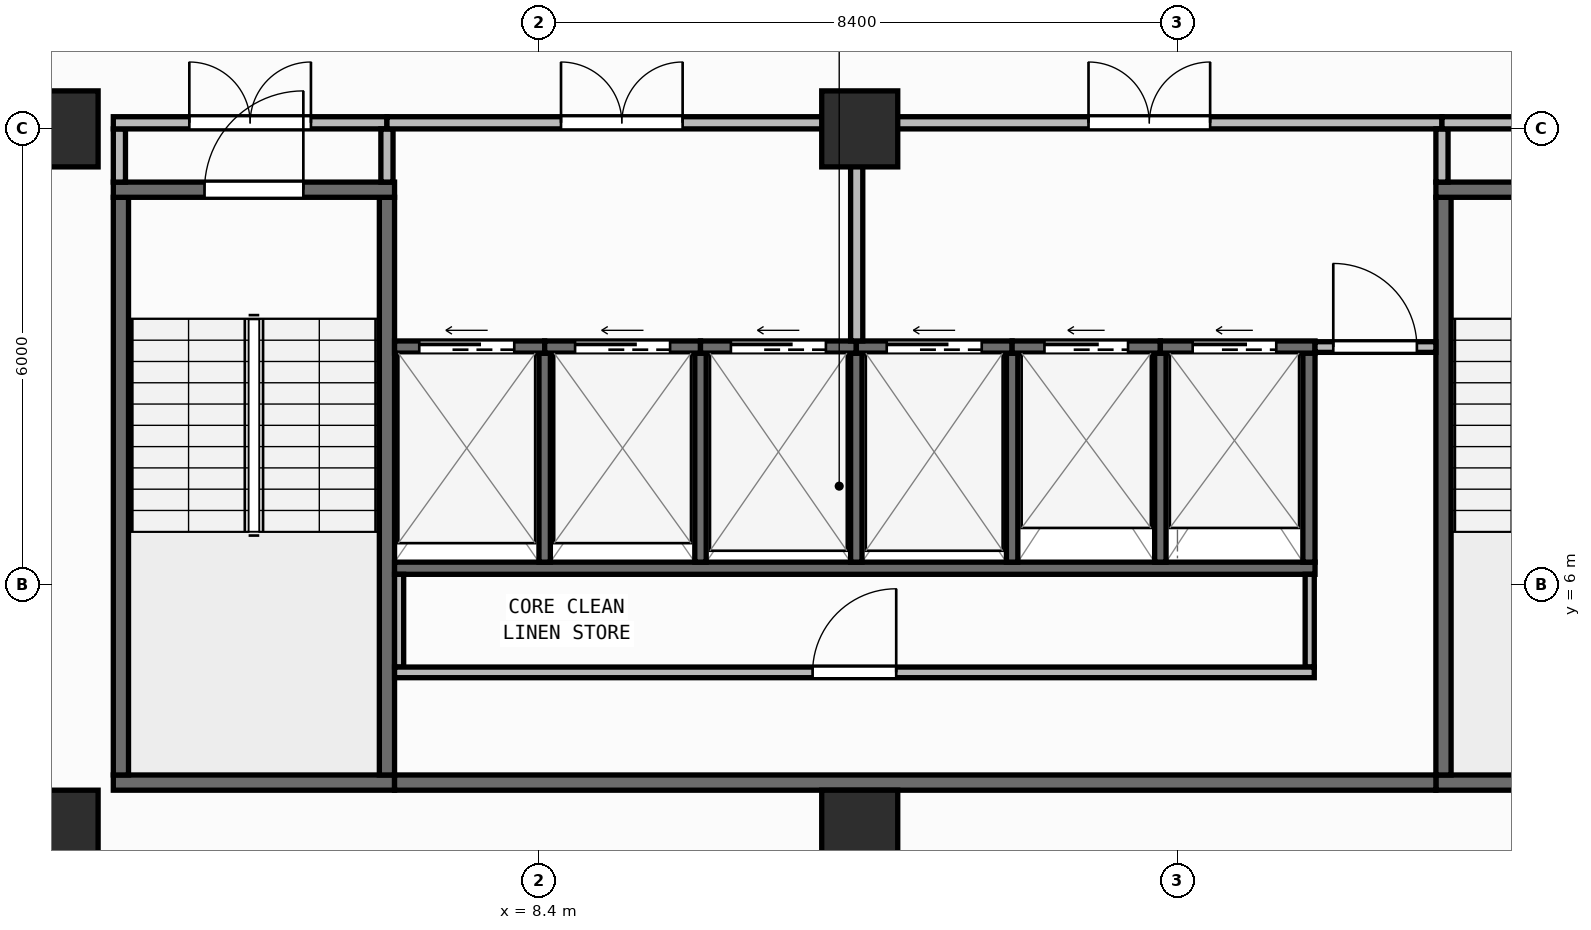
"""IFC4 building model, lengths in metres.
Left out: names, types, materials, properties, quantities, classifications, styles, units other than length and angle.
Written with IfcOpenShell. Run it as: python <this file> out.ifc"""

import sys

from ifc_helpers import new_model, si_unit, direction, frame, frame_2d, origin, origin_2d, place, context, subcontext, project, spatial, rectangle, extrude, element, fill, save


model = new_model("IFC4")
c1 = context("Model", 3, precision=1e-05, world=origin(), true_north=direction((0.0, 1.0)))
c2 = subcontext(c1, "Body", "Model", "MODEL_VIEW")
j1 = project(units=[si_unit("LENGTHUNIT", "METRE"), si_unit("PLANEANGLEUNIT", "RADIAN")], contexts=[c1])
p1 = place(None, origin())
s1 = spatial("IfcSite", under=j1, at=p1, CompositionType="ELEMENT")
p2 = place(p1, origin())
s2 = spatial("IfcBuilding", under=s1, at=p2, CompositionType="ELEMENT")
p3 = place(p2, frame((0.0, 0.0, 203.95)))
s3 = spatial("IfcBuildingStorey", under=s2, at=p3, CompositionType="ELEMENT", Elevation=203.95)
for number, where, z_axis, x_axis in (
    (1, (2.1, 2.8, 0.0), (0.0, 0.0, 1.0), (1.0, 0.0, 0.0)),
    (2, (12.62, 2.8, 0.0), (0.0, 0.0, 1.0), (1.0, 0.0, 0.0)),
    (3, (2.1, 12.0, 0.0), (0.0, 0.0, 1.0), (1.0, 0.0, 0.0)),
    (4, (12.62, 12.0, 0.0), (0.0, 0.0, 1.0), (1.0, 0.0, 0.0)),
):
    element("IfcColumn", number, at=place(p3, frame(where, z_axis=z_axis, x_axis=x_axis)), inside=s3, PredefinedType="COLUMN", context=c2, shape_type="SweptSolid", body=[
        extrude(rectangle(XDim=1.0, YDim=1.0, at=origin_2d()), origin(), (0.0, 0.0, 1.0), 3.95),
    ])
p4 = place(p3, frame((2.66, 0.174, 0.0), z_axis=(0.0, 0.0, 1.0), x_axis=(0.996634028439, 0.081979347142, 0.0)))
e5 = element("IfcWall", 5, at=p4, inside=s3, PredefinedType="STANDARD", context=c2, shape_type="SweptSolid", body=[
    extrude(rectangle(XDim=46.035, YDim=0.26, at=frame_2d((23.018, 0.0))), origin(), (0.0, 0.0, 1.0), 3.71),
])
p5 = place(p4, frame((21.817, 0.0, 0.9)))
e6 = element("IfcOpeningElement", 6, at=p5, cuts=e5, PredefinedType="OPENING", context=c2, shape_type="SweptSolid", body=[
    extrude(rectangle(XDim=2.4, YDim=1.65, at=frame_2d((1.2, 0.825))), frame((0.0, 0.14, 0.0), z_axis=(0.0, -1.0, 0.0), x_axis=(1.0, 0.0, 0.0)), (0.0, 0.0, 1.0), 0.28),
])
p6 = place(p3, frame((2.8, 3.4, 0.0), z_axis=(0.0, 0.0, 1.0), x_axis=(1.0, 0.0, 0.0)))
e7 = element("IfcWall", 7, at=p6, inside=s3, PredefinedType="SHEAR", context=c2, shape_type="SweptSolid", body=[
    extrude(rectangle(XDim=3.7, YDim=0.2, at=frame_2d((1.85, 0.0))), origin(), (0.0, 0.0, 1.0), 3.71),
])
for number, where, z_axis, x_axis in (
    (8, (2.9, 3.5, 0.0), (0.0, 0.0, 1.0), (0.0, 1.0, 0.0)),
    (9, (6.4, 3.5, 0.0), (0.0, 0.0, 1.0), (0.0, 1.0, 0.0)),
):
    element("IfcWall", number, at=place(p3, frame(where, z_axis=z_axis, x_axis=x_axis)), inside=s3, PredefinedType="SHEAR", context=c2, shape_type="SweptSolid", body=[
        extrude(rectangle(XDim=7.6, YDim=0.2, at=frame_2d((3.8, 0.0))), origin(), (0.0, 0.0, 1.0), 3.71),
    ])
p7 = place(p3, frame((2.8, 11.2, 0.0), z_axis=(0.0, 0.0, 1.0), x_axis=(1.0, 0.0, 0.0)))
e10 = element("IfcWall", 10, at=p7, inside=s3, PredefinedType="SHEAR", context=c2, shape_type="SweptSolid", body=[
    extrude(rectangle(XDim=3.7, YDim=0.2, at=frame_2d((1.85, 0.0))), origin(), (0.0, 0.0, 1.0), 3.71),
])
p8 = place(p7, frame((1.2, 0.0, 0.0)))
e11 = element("IfcOpeningElement", 11, at=p8, cuts=e10, PredefinedType="OPENING", context=c2, shape_type="SweptSolid", body=[
    extrude(rectangle(XDim=1.3, YDim=2.15, at=frame_2d((0.65, 1.075))), frame((0.0, 0.11, 0.0), z_axis=(0.0, -1.0, 0.0), x_axis=(1.0, 0.0, 0.0)), (0.0, 0.0, 1.0), 0.22),
])
p9 = place(p3, frame((20.2, 3.4, 0.0), z_axis=(0.0, 0.0, 1.0), x_axis=(1.0, 0.0, 0.0)))
e12 = element("IfcWall", 12, at=p9, inside=s3, PredefinedType="SHEAR", context=c2, shape_type="SweptSolid", body=[
    extrude(rectangle(XDim=3.7, YDim=0.2, at=frame_2d((1.85, 0.0))), origin(), (0.0, 0.0, 1.0), 3.71),
])
p10 = place(p3, frame((20.3, 3.5, 0.0), z_axis=(0.0, 0.0, 1.0), x_axis=(0.0, 1.0, 0.0)))
e13 = element("IfcWall", 13, at=p10, inside=s3, PredefinedType="SHEAR", context=c2, shape_type="SweptSolid", body=[
    extrude(rectangle(XDim=7.6, YDim=0.2, at=frame_2d((3.8, 0.0))), origin(), (0.0, 0.0, 1.0), 3.71),
])
p11 = place(p3, frame((20.2, 11.2, 0.0), z_axis=(0.0, 0.0, 1.0), x_axis=(1.0, 0.0, 0.0)))
e14 = element("IfcWall", 14, at=p11, inside=s3, PredefinedType="SHEAR", context=c2, shape_type="SweptSolid", body=[
    extrude(rectangle(XDim=3.7, YDim=0.2, at=frame_2d((1.85, 0.0))), origin(), (0.0, 0.0, 1.0), 3.71),
])
p12 = place(p11, frame((1.2, 0.0, 0.0)))
e15 = element("IfcOpeningElement", 15, at=p12, cuts=e14, PredefinedType="OPENING", context=c2, shape_type="SweptSolid", body=[
    extrude(rectangle(XDim=1.3, YDim=2.15, at=frame_2d((0.65, 1.075))), frame((0.0, 0.11, 0.0), z_axis=(0.0, -1.0, 0.0), x_axis=(1.0, 0.0, 0.0)), (0.0, 0.0, 1.0), 0.22),
])
p13 = place(p3, frame((6.5, 3.4, 0.0), z_axis=(0.0, 0.0, 1.0), x_axis=(1.0, 0.0, 0.0)))
e16 = element("IfcWall", 16, at=p13, inside=s3, PredefinedType="SHEAR", context=c2, shape_type="SweptSolid", body=[
    extrude(rectangle(XDim=13.7, YDim=0.2, at=frame_2d((6.85, 0.0))), origin(), (0.0, 0.0, 1.0), 3.71),
])
p14 = place(p3, frame((6.5, 6.22, 0.0), z_axis=(0.0, 0.0, 1.0), x_axis=(1.0, 0.0, 0.0)))
e17 = element("IfcWall", 17, at=p14, inside=s3, PredefinedType="SHEAR", context=c2, shape_type="SweptSolid", body=[
    extrude(rectangle(XDim=12.11, YDim=0.16, at=frame_2d((6.055, 0.0))), origin(), (0.0, 0.0, 1.0), 3.71),
])
p15 = place(p3, frame((18.53, 6.3, 0.0), z_axis=(0.0, 0.0, 1.0), x_axis=(0.0, 1.0, 0.0)))
e18 = element("IfcWall", 18, at=p15, inside=s3, PredefinedType="SHEAR", context=c2, shape_type="SweptSolid", body=[
    extrude(rectangle(XDim=2.75, YDim=0.16, at=frame_2d((1.375, 0.0))), origin(), (0.0, 0.0, 1.0), 3.71),
])
for number, where, z_axis, x_axis in (
    (19, (8.475, 6.3, 0.0), (0.0, 0.0, 1.0), (0.0, 1.0, 0.0)),
    (20, (10.525, 6.3, 0.0), (0.0, 0.0, 1.0), (0.0, 1.0, 0.0)),
    (21, (12.575, 6.3, 0.0), (0.0, 0.0, 1.0), (0.0, 1.0, 0.0)),
    (22, (14.625, 6.3, 0.0), (0.0, 0.0, 1.0), (0.0, 1.0, 0.0)),
    (23, (16.575, 6.3, 0.0), (0.0, 0.0, 1.0), (0.0, 1.0, 0.0)),
):
    element("IfcWall", number, at=place(p3, frame(where, z_axis=z_axis, x_axis=x_axis)), inside=s3, PredefinedType="SHEAR", context=c2, shape_type="SweptSolid", body=[
        extrude(rectangle(XDim=2.75, YDim=0.15, at=frame_2d((1.375, 0.0))), origin(), (0.0, 0.0, 1.0), 3.71),
    ])
p16 = place(p3, frame((6.5, 9.13, 0.0), z_axis=(0.0, 0.0, 1.0), x_axis=(1.0, 0.0, 0.0)))
e24 = element("IfcWall", 24, at=p16, inside=s3, PredefinedType="SHEAR", context=c2, shape_type="SweptSolid", body=[
    extrude(rectangle(XDim=1.975, YDim=0.16, at=frame_2d((0.988, 0.0))), origin(), (0.0, 0.0, 1.0), 3.71),
])
p17 = place(p16, frame((0.325, 0.0, 0.0)))
e25 = element("IfcOpeningElement", 25, at=p17, cuts=e24, PredefinedType="OPENING", context=c2, shape_type="SweptSolid", body=[
    extrude(rectangle(XDim=1.25, YDim=2.15, at=frame_2d((0.625, 1.075))), frame((0.0, 0.09, 0.0), z_axis=(0.0, -1.0, 0.0), x_axis=(1.0, 0.0, 0.0)), (0.0, 0.0, 1.0), 0.18),
])
p18 = place(p3, frame((8.475, 9.13, 0.0), z_axis=(0.0, 0.0, 1.0), x_axis=(1.0, 0.0, 0.0)))
e26 = element("IfcWall", 26, at=p18, inside=s3, PredefinedType="SHEAR", context=c2, shape_type="SweptSolid", body=[
    extrude(rectangle(XDim=2.05, YDim=0.16, at=frame_2d((1.025, 0.0))), origin(), (0.0, 0.0, 1.0), 3.71),
])
p19 = place(p18, frame((0.4, 0.0, 0.0)))
e27 = element("IfcOpeningElement", 27, at=p19, cuts=e26, PredefinedType="OPENING", context=c2, shape_type="SweptSolid", body=[
    extrude(rectangle(XDim=1.25, YDim=2.15, at=frame_2d((0.625, 1.075))), frame((0.0, 0.09, 0.0), z_axis=(0.0, -1.0, 0.0), x_axis=(1.0, 0.0, 0.0)), (0.0, 0.0, 1.0), 0.18),
])
p20 = place(p3, frame((10.525, 9.13, 0.0), z_axis=(0.0, 0.0, 1.0), x_axis=(1.0, 0.0, 0.0)))
e28 = element("IfcWall", 28, at=p20, inside=s3, PredefinedType="SHEAR", context=c2, shape_type="SweptSolid", body=[
    extrude(rectangle(XDim=2.05, YDim=0.16, at=frame_2d((1.025, 0.0))), origin(), (0.0, 0.0, 1.0), 3.71),
])
p21 = place(p20, frame((0.4, 0.0, 0.0)))
e29 = element("IfcOpeningElement", 29, at=p21, cuts=e28, PredefinedType="OPENING", context=c2, shape_type="SweptSolid", body=[
    extrude(rectangle(XDim=1.25, YDim=2.15, at=frame_2d((0.625, 1.075))), frame((0.0, 0.09, 0.0), z_axis=(0.0, -1.0, 0.0), x_axis=(1.0, 0.0, 0.0)), (0.0, 0.0, 1.0), 0.18),
])
p22 = place(p3, frame((12.575, 9.13, 0.0), z_axis=(0.0, 0.0, 1.0), x_axis=(1.0, 0.0, 0.0)))
e30 = element("IfcWall", 30, at=p22, inside=s3, PredefinedType="SHEAR", context=c2, shape_type="SweptSolid", body=[
    extrude(rectangle(XDim=2.05, YDim=0.16, at=frame_2d((1.025, 0.0))), origin(), (0.0, 0.0, 1.0), 3.71),
])
p23 = place(p22, frame((0.4, 0.0, 0.0)))
e31 = element("IfcOpeningElement", 31, at=p23, cuts=e30, PredefinedType="OPENING", context=c2, shape_type="SweptSolid", body=[
    extrude(rectangle(XDim=1.25, YDim=2.15, at=frame_2d((0.625, 1.075))), frame((0.0, 0.09, 0.0), z_axis=(0.0, -1.0, 0.0), x_axis=(1.0, 0.0, 0.0)), (0.0, 0.0, 1.0), 0.18),
])
p24 = place(p3, frame((14.625, 9.13, 0.0), z_axis=(0.0, 0.0, 1.0), x_axis=(1.0, 0.0, 0.0)))
e32 = element("IfcWall", 32, at=p24, inside=s3, PredefinedType="SHEAR", context=c2, shape_type="SweptSolid", body=[
    extrude(rectangle(XDim=1.95, YDim=0.16, at=frame_2d((0.975, 0.0))), origin(), (0.0, 0.0, 1.0), 3.71),
])
p25 = place(p24, frame((0.425, 0.0, 0.0)))
e33 = element("IfcOpeningElement", 33, at=p25, cuts=e32, PredefinedType="OPENING", context=c2, shape_type="SweptSolid", body=[
    extrude(rectangle(XDim=1.1, YDim=2.15, at=frame_2d((0.55, 1.075))), frame((0.0, 0.09, 0.0), z_axis=(0.0, -1.0, 0.0), x_axis=(1.0, 0.0, 0.0)), (0.0, 0.0, 1.0), 0.18),
])
p26 = place(p3, frame((16.575, 9.13, 0.0), z_axis=(0.0, 0.0, 1.0), x_axis=(1.0, 0.0, 0.0)))
e34 = element("IfcWall", 34, at=p26, inside=s3, PredefinedType="SHEAR", context=c2, shape_type="SweptSolid", body=[
    extrude(rectangle(XDim=2.035, YDim=0.16, at=frame_2d((1.018, 0.0))), origin(), (0.0, 0.0, 1.0), 3.71),
])
p27 = place(p26, frame((0.425, 0.0, 0.0)))
e35 = element("IfcOpeningElement", 35, at=p27, cuts=e34, PredefinedType="OPENING", context=c2, shape_type="SweptSolid", body=[
    extrude(rectangle(XDim=1.1, YDim=2.15, at=frame_2d((0.55, 1.075))), frame((0.0, 0.09, 0.0), z_axis=(0.0, -1.0, 0.0), x_axis=(1.0, 0.0, 0.0)), (0.0, 0.0, 1.0), 0.18),
])
for number, where, z_axis, x_axis in (
    (36, (6.56, 4.92, 0.0), (0.0, 0.0, 1.0), (0.0, 1.0, 0.0)),
    (37, (18.54, 4.92, 0.0), (0.0, 0.0, 1.0), (0.0, 1.0, 0.0)),
):
    element("IfcWall", number, at=place(p3, frame(where, z_axis=z_axis, x_axis=x_axis)), inside=s3, PredefinedType="PARTITIONING", context=c2, shape_type="SweptSolid", body=[
        extrude(rectangle(XDim=1.22, YDim=0.12, at=frame_2d((0.61, 0.0))), origin(), (0.0, 0.0, 1.0), 3.71),
    ])
p28 = place(p3, frame((6.5, 4.85, 0.0), z_axis=(0.0, 0.0, 1.0), x_axis=(1.0, 0.0, 0.0)))
e38 = element("IfcWall", 38, at=p28, inside=s3, PredefinedType="PARTITIONING", context=c2, shape_type="SweptSolid", body=[
    extrude(rectangle(XDim=12.1, YDim=0.14, at=frame_2d((6.05, 0.0))), origin(), (0.0, 0.0, 1.0), 3.71),
])
p29 = place(p28, frame((5.5, 0.0, 0.0)))
e39 = element("IfcOpeningElement", 39, at=p29, cuts=e38, PredefinedType="OPENING", context=c2, shape_type="SweptSolid", body=[
    extrude(rectangle(XDim=1.1, YDim=2.1, at=frame_2d((0.55, 1.05))), frame((0.0, 0.08, 0.0), z_axis=(0.0, -1.0, 0.0), x_axis=(1.0, 0.0, 0.0)), (0.0, 0.0, 1.0), 0.16),
])
p30 = place(p3, frame((18.61, 9.13, 0.0), z_axis=(0.0, 0.0, 1.0), x_axis=(1.0, 0.0, 0.0)))
e40 = element("IfcWall", 40, at=p30, inside=s3, PredefinedType="PARTITIONING", context=c2, shape_type="SweptSolid", body=[
    extrude(rectangle(XDim=1.59, YDim=0.14, at=frame_2d((0.795, 0.0))), origin(), (0.0, 0.0, 1.0), 3.71),
])
p31 = place(p30, frame((0.24, 0.0, 0.0)))
e41 = element("IfcOpeningElement", 41, at=p31, cuts=e40, PredefinedType="OPENING", context=c2, shape_type="SweptSolid", body=[
    extrude(rectangle(XDim=1.1, YDim=2.1, at=frame_2d((0.55, 1.05))), frame((0.0, 0.08, 0.0), z_axis=(0.0, -1.0, 0.0), x_axis=(1.0, 0.0, 0.0)), (0.0, 0.0, 1.0), 0.16),
])
p32 = place(p3, frame((2.88, 11.3, 0.0), z_axis=(0.0, 0.0, 1.0), x_axis=(0.0, 1.0, 0.0)))
e42 = element("IfcWall", 42, at=p32, inside=s3, PredefinedType="PARTITIONING", context=c2, shape_type="SweptSolid", body=[
    extrude(rectangle(XDim=0.7, YDim=0.16, at=frame_2d((0.35, 0.0))), origin(), (0.0, 0.0, 1.0), 3.71),
])
p33 = place(p3, frame((2.8, 12.08, 0.0), z_axis=(0.0, 0.0, 1.0), x_axis=(1.0, 0.0, 0.0)))
e43 = element("IfcWall", 43, at=p33, inside=s3, PredefinedType="PARTITIONING", context=c2, shape_type="SweptSolid", body=[
    extrude(rectangle(XDim=3.6, YDim=0.16, at=frame_2d((1.8, 0.0))), origin(), (0.0, 0.0, 1.0), 3.152),
])
p34 = place(p33, frame((1.0, 0.0, 0.0)))
e44 = element("IfcOpeningElement", 44, at=p34, cuts=e43, PredefinedType="OPENING", context=c2, shape_type="SweptSolid", body=[
    extrude(rectangle(XDim=1.6, YDim=2.05, at=frame_2d((0.8, 1.025))), frame((0.0, 0.09, 0.0), z_axis=(0.0, -1.0, 0.0), x_axis=(1.0, 0.0, 0.0)), (0.0, 0.0, 1.0), 0.18),
])
p35 = place(p3, frame((6.4, 11.3, 0.0), z_axis=(0.0, 0.0, 1.0), x_axis=(0.0, 1.0, 0.0)))
e45 = element("IfcWall", 45, at=p35, inside=s3, PredefinedType="PARTITIONING", context=c2, shape_type="SweptSolid", body=[
    extrude(rectangle(XDim=0.7, YDim=0.16, at=frame_2d((0.35, 0.0))), origin(), (0.0, 0.0, 1.0), 3.71),
])
p36 = place(p3, frame((6.4, 12.08, 0.0), z_axis=(0.0, 0.0, 1.0), x_axis=(1.0, 0.0, 0.0)))
e46 = element("IfcWall", 46, at=p36, inside=s3, PredefinedType="PARTITIONING", context=c2, shape_type="SweptSolid", body=[
    extrude(rectangle(XDim=6.18, YDim=0.16, at=frame_2d((3.09, 0.0))), origin(), (0.0, 0.0, 1.0), 3.152),
])
p37 = place(p36, frame((2.29, 0.0, 0.0)))
e47 = element("IfcOpeningElement", 47, at=p37, cuts=e46, PredefinedType="OPENING", context=c2, shape_type="SweptSolid", body=[
    extrude(rectangle(XDim=1.6, YDim=2.05, at=frame_2d((0.8, 1.025))), frame((0.0, 0.09, 0.0), z_axis=(0.0, -1.0, 0.0), x_axis=(1.0, 0.0, 0.0)), (0.0, 0.0, 1.0), 0.18),
])
p38 = place(p3, frame((12.58, 9.21, 0.0), z_axis=(0.0, 0.0, 1.0), x_axis=(0.0, 1.0, 0.0)))
e48 = element("IfcWall", 48, at=p38, inside=s3, PredefinedType="PARTITIONING", context=c2, shape_type="SweptSolid", body=[
    extrude(rectangle(XDim=2.79, YDim=0.16, at=frame_2d((1.395, 0.0))), origin(), (0.0, 0.0, 1.0), 3.71),
])
p39 = place(p3, frame((12.58, 12.08, 0.0), z_axis=(0.0, 0.0, 1.0), x_axis=(1.0, 0.0, 0.0)))
e49 = element("IfcWall", 49, at=p39, inside=s3, PredefinedType="PARTITIONING", context=c2, shape_type="SweptSolid", body=[
    extrude(rectangle(XDim=7.7, YDim=0.16, at=frame_2d((3.85, 0.0))), origin(), (0.0, 0.0, 1.0), 3.152),
])
p40 = place(p39, frame((3.05, 0.0, 0.0)))
e50 = element("IfcOpeningElement", 50, at=p40, cuts=e49, PredefinedType="OPENING", context=c2, shape_type="SweptSolid", body=[
    extrude(rectangle(XDim=1.6, YDim=2.05, at=frame_2d((0.8, 1.025))), frame((0.0, 0.09, 0.0), z_axis=(0.0, -1.0, 0.0), x_axis=(1.0, 0.0, 0.0)), (0.0, 0.0, 1.0), 0.18),
])
p41 = place(p3, frame((20.28, 11.3, 0.0), z_axis=(0.0, 0.0, 1.0), x_axis=(0.0, 1.0, 0.0)))
e51 = element("IfcWall", 51, at=p41, inside=s3, PredefinedType="PARTITIONING", context=c2, shape_type="SweptSolid", body=[
    extrude(rectangle(XDim=0.7, YDim=0.16, at=frame_2d((0.35, 0.0))), origin(), (0.0, 0.0, 1.0), 3.71),
])
p42 = place(p3, frame((20.28, 12.08, 0.0), z_axis=(0.0, 0.0, 1.0), x_axis=(1.0, 0.0, 0.0)))
e52 = element("IfcWall", 52, at=p42, inside=s3, PredefinedType="PARTITIONING", context=c2, shape_type="SweptSolid", body=[
    extrude(rectangle(XDim=3.62, YDim=0.16, at=frame_2d((1.81, 0.0))), origin(), (0.0, 0.0, 1.0), 3.152),
])
p43 = place(p42, frame((1.01, 0.0, 0.0)))
e53 = element("IfcOpeningElement", 53, at=p43, cuts=e52, PredefinedType="OPENING", context=c2, shape_type="SweptSolid", body=[
    extrude(rectangle(XDim=1.6, YDim=2.05, at=frame_2d((0.8, 1.025))), frame((0.0, 0.09, 0.0), z_axis=(0.0, -1.0, 0.0), x_axis=(1.0, 0.0, 0.0)), (0.0, 0.0, 1.0), 0.18),
])
p44 = place(p8, origin())
e54 = element("IfcDoor", 54, at=p44, inside=s3, OperationType="SINGLE_SWING_RIGHT", PredefinedType="DOOR", context=c2, shape_type="SweptSolid", body=[
    extrude(rectangle(XDim=1.3, YDim=2.15, at=frame_2d((0.65, 1.075))), frame((0.0, 0.025, 0.0), z_axis=(0.0, -1.0, 0.0), x_axis=(1.0, 0.0, 0.0)), (0.0, 0.0, 1.0), 0.05),
])
fill(e11, e54)
p45 = place(p17, origin())
e55 = element("IfcDoor", 55, at=p45, inside=s3, OperationType="SLIDING_TO_LEFT", PredefinedType="DOOR", context=c2, shape_type="SweptSolid", body=[
    extrude(rectangle(XDim=1.25, YDim=2.15, at=frame_2d((0.625, 1.075))), frame((0.0, 0.025, 0.0), z_axis=(0.0, -1.0, 0.0), x_axis=(1.0, 0.0, 0.0)), (0.0, 0.0, 1.0), 0.05),
])
fill(e25, e55)
p46 = place(p19, origin())
e56 = element("IfcDoor", 56, at=p46, inside=s3, OperationType="SLIDING_TO_LEFT", PredefinedType="DOOR", context=c2, shape_type="SweptSolid", body=[
    extrude(rectangle(XDim=1.25, YDim=2.15, at=frame_2d((0.625, 1.075))), frame((0.0, 0.025, 0.0), z_axis=(0.0, -1.0, 0.0), x_axis=(1.0, 0.0, 0.0)), (0.0, 0.0, 1.0), 0.05),
])
fill(e27, e56)
p47 = place(p21, origin())
e57 = element("IfcDoor", 57, at=p47, inside=s3, OperationType="SLIDING_TO_LEFT", PredefinedType="DOOR", context=c2, shape_type="SweptSolid", body=[
    extrude(rectangle(XDim=1.25, YDim=2.15, at=frame_2d((0.625, 1.075))), frame((0.0, 0.025, 0.0), z_axis=(0.0, -1.0, 0.0), x_axis=(1.0, 0.0, 0.0)), (0.0, 0.0, 1.0), 0.05),
])
fill(e29, e57)
p48 = place(p23, origin())
e58 = element("IfcDoor", 58, at=p48, inside=s3, OperationType="SLIDING_TO_LEFT", PredefinedType="DOOR", context=c2, shape_type="SweptSolid", body=[
    extrude(rectangle(XDim=1.25, YDim=2.15, at=frame_2d((0.625, 1.075))), frame((0.0, 0.025, 0.0), z_axis=(0.0, -1.0, 0.0), x_axis=(1.0, 0.0, 0.0)), (0.0, 0.0, 1.0), 0.05),
])
fill(e31, e58)
p49 = place(p25, origin())
e59 = element("IfcDoor", 59, at=p49, inside=s3, OperationType="SLIDING_TO_LEFT", PredefinedType="DOOR", context=c2, shape_type="SweptSolid", body=[
    extrude(rectangle(XDim=1.1, YDim=2.15, at=frame_2d((0.55, 1.075))), frame((0.0, 0.025, 0.0), z_axis=(0.0, -1.0, 0.0), x_axis=(1.0, 0.0, 0.0)), (0.0, 0.0, 1.0), 0.05),
])
fill(e33, e59)
p50 = place(p27, origin())
e60 = element("IfcDoor", 60, at=p50, inside=s3, OperationType="SLIDING_TO_LEFT", PredefinedType="DOOR", context=c2, shape_type="SweptSolid", body=[
    extrude(rectangle(XDim=1.1, YDim=2.15, at=frame_2d((0.55, 1.075))), frame((0.0, 0.025, 0.0), z_axis=(0.0, -1.0, 0.0), x_axis=(1.0, 0.0, 0.0)), (0.0, 0.0, 1.0), 0.05),
])
fill(e35, e60)
p51 = place(p29, origin())
e61 = element("IfcDoor", 61, at=p51, inside=s3, OperationType="SINGLE_SWING_RIGHT", PredefinedType="DOOR", context=c2, shape_type="SweptSolid", body=[
    extrude(rectangle(XDim=1.1, YDim=2.1, at=frame_2d((0.55, 1.05))), frame((0.0, 0.025, 0.0), z_axis=(0.0, -1.0, 0.0), x_axis=(1.0, 0.0, 0.0)), (0.0, 0.0, 1.0), 0.05),
])
fill(e39, e61)
p52 = place(p31, origin())
e62 = element("IfcDoor", 62, at=p52, inside=s3, OperationType="SINGLE_SWING_LEFT", PredefinedType="DOOR", context=c2, shape_type="SweptSolid", body=[
    extrude(rectangle(XDim=1.1, YDim=2.1, at=frame_2d((0.55, 1.05))), frame((0.0, 0.025, 0.0), z_axis=(0.0, -1.0, 0.0), x_axis=(1.0, 0.0, 0.0)), (0.0, 0.0, 1.0), 0.05),
])
fill(e41, e62)
p53 = place(p34, origin())
e63 = element("IfcDoor", 63, at=p53, inside=s3, OperationType="DOUBLE_DOOR_SINGLE_SWING", PredefinedType="DOOR", context=c2, shape_type="SweptSolid", body=[
    extrude(rectangle(XDim=1.6, YDim=2.05, at=frame_2d((0.8, 1.025))), frame((0.0, 0.025, 0.0), z_axis=(0.0, -1.0, 0.0), x_axis=(1.0, 0.0, 0.0)), (0.0, 0.0, 1.0), 0.05),
])
fill(e44, e63)
p54 = place(p37, origin())
e64 = element("IfcDoor", 64, at=p54, inside=s3, OperationType="DOUBLE_DOOR_SINGLE_SWING", PredefinedType="DOOR", context=c2, shape_type="SweptSolid", body=[
    extrude(rectangle(XDim=1.6, YDim=2.05, at=frame_2d((0.8, 1.025))), frame((0.0, 0.025, 0.0), z_axis=(0.0, -1.0, 0.0), x_axis=(1.0, 0.0, 0.0)), (0.0, 0.0, 1.0), 0.05),
])
fill(e47, e64)
p55 = place(p40, origin())
e65 = element("IfcDoor", 65, at=p55, inside=s3, OperationType="DOUBLE_DOOR_SINGLE_SWING", PredefinedType="DOOR", context=c2, shape_type="SweptSolid", body=[
    extrude(rectangle(XDim=1.6, YDim=2.05, at=frame_2d((0.8, 1.025))), frame((0.0, 0.025, 0.0), z_axis=(0.0, -1.0, 0.0), x_axis=(1.0, 0.0, 0.0)), (0.0, 0.0, 1.0), 0.05),
])
fill(e50, e65)
save(model, sys.argv[1])
